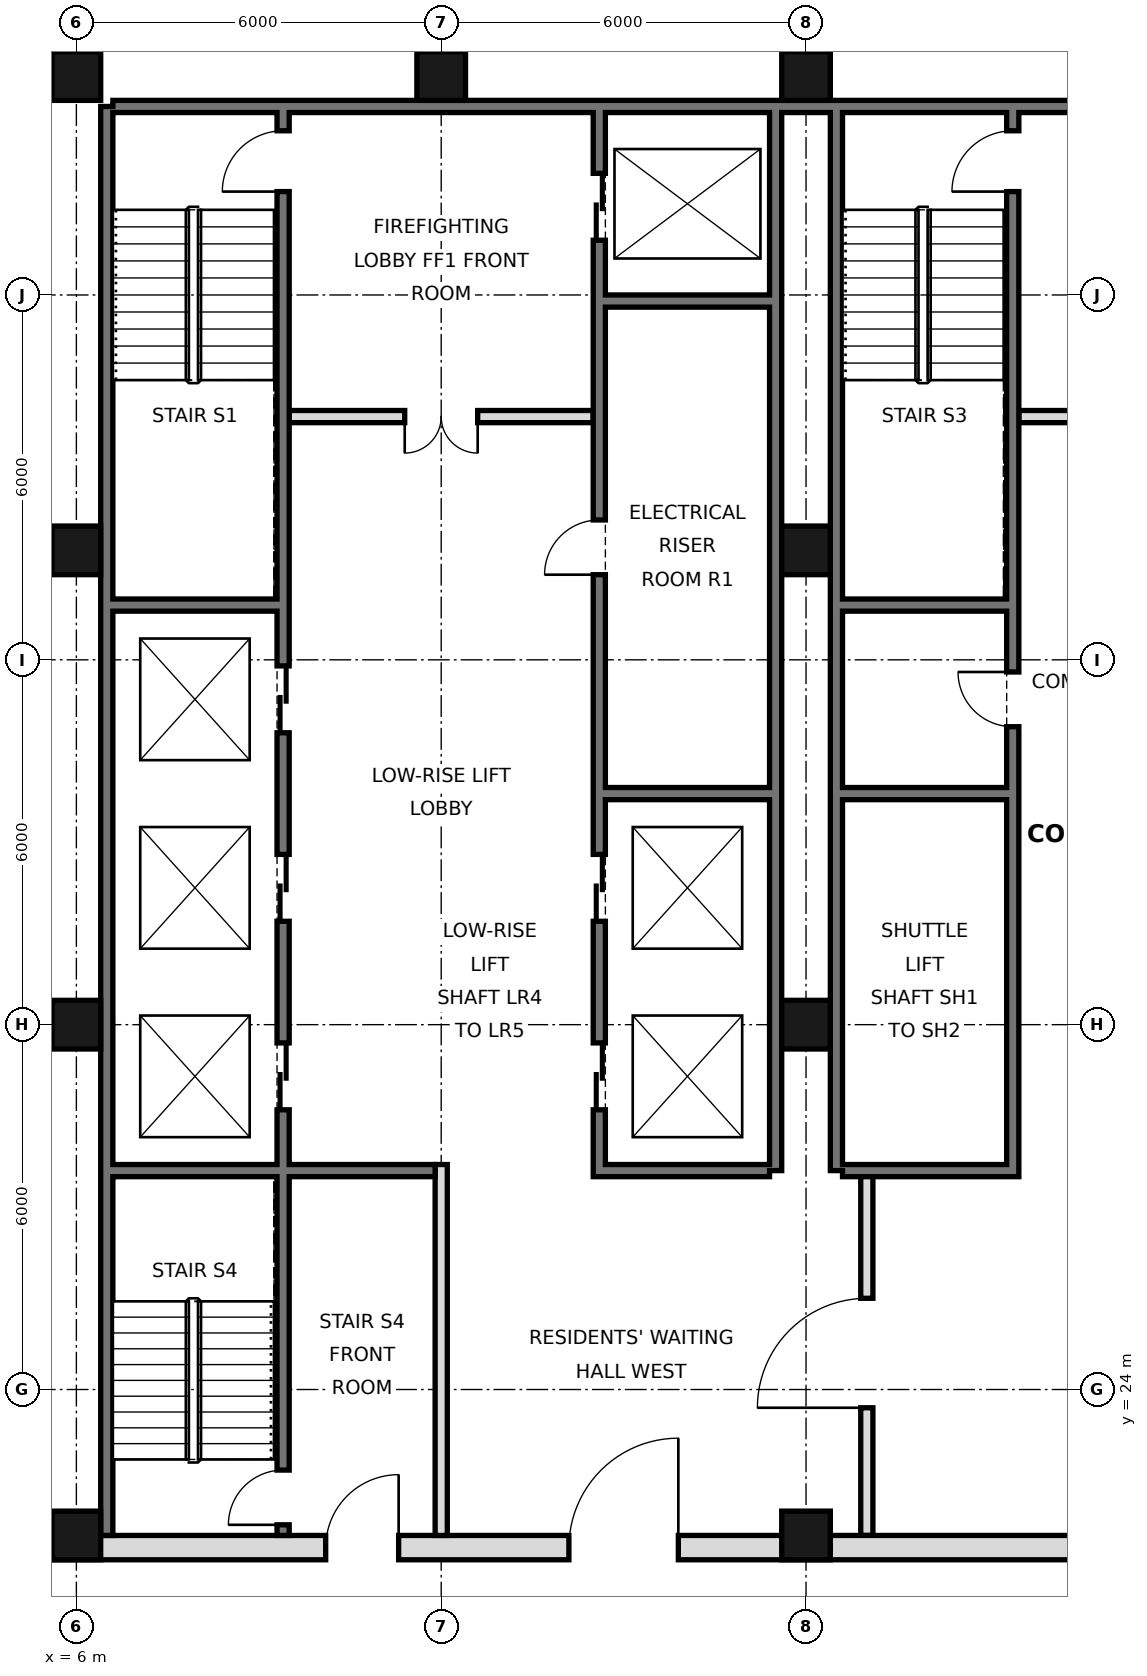
"""IFC4 building model, lengths in metres.
Left out: names, types, materials, properties, quantities, classifications, styles, units other than length and angle.
Written with IfcOpenShell. Run it as: python <this file> out.ifc"""

import sys

from ifc_helpers import new_model, si_unit, direction, frame, frame_2d, origin, origin_2d, place, context, subcontext, project, spatial, rectangle, hollow_rectangle, extrude, element, fill, save


model = new_model("IFC4")
c1 = context("Model", 3, precision=1e-05, world=origin(), true_north=direction((0.0, 1.0)))
c2 = subcontext(c1, "Body", "Model", "MODEL_VIEW")
j1 = project(units=[si_unit("LENGTHUNIT", "METRE"), si_unit("PLANEANGLEUNIT", "RADIAN")], contexts=[c1])
p1 = place(None, origin())
s1 = spatial("IfcSite", under=j1, at=p1, CompositionType="ELEMENT")
p2 = place(p1, origin())
s2 = spatial("IfcBuilding", under=s1, at=p2, CompositionType="ELEMENT")
p3 = place(p2, frame((0.0, 0.0, 96.2)))
s3 = spatial("IfcBuildingStorey", under=s2, at=p3, CompositionType="ELEMENT", Elevation=96.2)
for number, where, z_axis, x_axis in (
    (1, (6.0, 21.6, 0.0), (0.0, 0.0, 1.0), (1.0, 0.0, 0.0)),
    (2, (6.0, 30.0, 0.0), (0.0, 0.0, 1.0), (1.0, 0.0, 0.0)),
    (3, (6.0, 37.8, 0.0), (0.0, 0.0, 1.0), (1.0, 0.0, 0.0)),
    (4, (6.0, 45.6, 0.0), (0.0, 0.0, 1.0), (1.0, 0.0, 0.0)),
    (5, (12.0, 45.6, 0.0), (0.0, 0.0, 1.0), (1.0, 0.0, 0.0)),
    (6, (18.0, 21.6, 0.0), (0.0, 0.0, 1.0), (1.0, 0.0, 0.0)),
    (7, (18.0, 30.0, 0.0), (0.0, 0.0, 1.0), (1.0, 0.0, 0.0)),
    (8, (18.0, 37.8, 0.0), (0.0, 0.0, 1.0), (1.0, 0.0, 0.0)),
    (9, (18.0, 45.6, 0.0), (0.0, 0.0, 1.0), (1.0, 0.0, 0.0)),
):
    element("IfcColumn", number, at=place(p3, frame(where, z_axis=z_axis, x_axis=x_axis)), inside=s3, PredefinedType="COLUMN", context=c2, shape_type="SweptSolid", body=[
        extrude(hollow_rectangle(XDim=0.8, YDim=0.8, WallThickness=0.05, at=origin_2d()), origin(), (0.0, 0.0, 1.0), 3.6),
    ])
p4 = place(p3, frame((6.5, 21.6, 0.0), z_axis=(0.0, 0.0, 1.0), x_axis=(0.0, 1.0, 0.0)))
e10 = element("IfcWall", 10, at=p4, inside=s3, PredefinedType="SOLIDWALL", context=c2, shape_type="SweptSolid", body=[
    extrude(rectangle(XDim=23.5, YDim=0.2, at=frame_2d((11.75, 0.0))), origin(), (0.0, 0.0, 1.0), 3.42),
])
p5 = place(p3, frame((6.6, 45.1, 0.0), z_axis=(0.0, 0.0, 1.0), x_axis=(1.0, 0.0, 0.0)))
e11 = element("IfcWall", 11, at=p5, inside=s3, PredefinedType="SOLIDWALL", context=c2, shape_type="SweptSolid", body=[
    extrude(rectangle(XDim=34.8, YDim=0.2, at=frame_2d((17.4, 0.0))), origin(), (0.0, 0.0, 1.0), 3.42),
])
for number, where, z_axis, x_axis in (
    (12, (17.5, 27.6, 0.0), (0.0, 0.0, 1.0), (0.0, 1.0, 0.0)),
    (13, (18.5, 27.6, 0.0), (0.0, 0.0, 1.0), (0.0, 1.0, 0.0)),
):
    element("IfcWall", number, at=place(p3, frame(where, z_axis=z_axis, x_axis=x_axis)), inside=s3, PredefinedType="SOLIDWALL", context=c2, shape_type="SweptSolid", body=[
        extrude(rectangle(XDim=17.5, YDim=0.2, at=frame_2d((8.75, 0.0))), origin(), (0.0, 0.0, 1.0), 3.42),
    ])
p6 = place(p3, frame((5.6, 21.4, 0.0), z_axis=(0.0, 0.0, 1.0), x_axis=(1.0, 0.0, 0.0)))
e14 = element("IfcWall", 14, at=p6, inside=s3, PredefinedType="SOLIDWALL", context=c2, shape_type="SweptSolid", body=[
    extrude(rectangle(XDim=36.8, YDim=0.4, at=frame_2d((18.4, 0.0))), origin(), (0.0, 0.0, 1.0), 3.42),
])
p7 = place(p6, frame((8.5, 0.0, 0.0)))
e15 = element("IfcOpeningElement", 15, at=p7, cuts=e14, PredefinedType="OPENING", context=c2, shape_type="SweptSolid", body=[
    extrude(rectangle(XDim=1.8, YDim=2.1, at=frame_2d((0.9, 1.05))), frame((0.0, 0.21, 0.0), z_axis=(0.0, -1.0, 0.0), x_axis=(1.0, 0.0, 0.0)), (0.0, 0.0, 1.0), 0.42),
])
p8 = place(p6, frame((17.5, 0.0, 0.0)))
e16 = element("IfcOpeningElement", 16, at=p8, cuts=e14, PredefinedType="OPENING", context=c2, shape_type="SweptSolid", body=[
    extrude(rectangle(XDim=1.8, YDim=2.1, at=frame_2d((0.9, 1.05))), frame((0.0, 0.21, 0.0), z_axis=(0.0, -1.0, 0.0), x_axis=(1.0, 0.0, 0.0)), (0.0, 0.0, 1.0), 0.42),
])
p9 = place(p6, frame((26.5, 0.0, 0.0)))
e17 = element("IfcOpeningElement", 17, at=p9, cuts=e14, PredefinedType="OPENING", context=c2, shape_type="SweptSolid", body=[
    extrude(rectangle(XDim=1.8, YDim=2.1, at=frame_2d((0.9, 1.05))), frame((0.0, 0.21, 0.0), z_axis=(0.0, -1.0, 0.0), x_axis=(1.0, 0.0, 0.0)), (0.0, 0.0, 1.0), 0.42),
])
p10 = place(p6, frame((4.5, 0.0, 0.0)))
e18 = element("IfcOpeningElement", 18, at=p10, cuts=e14, PredefinedType="OPENING", context=c2, shape_type="SweptSolid", body=[
    extrude(rectangle(XDim=1.2, YDim=2.1, at=frame_2d((0.6, 1.05))), frame((0.0, 0.21, 0.0), z_axis=(0.0, -1.0, 0.0), x_axis=(1.0, 0.0, 0.0)), (0.0, 0.0, 1.0), 0.42),
])
p11 = place(p6, frame((31.1, 0.0, 0.0)))
e19 = element("IfcOpeningElement", 19, at=p11, cuts=e14, PredefinedType="OPENING", context=c2, shape_type="SweptSolid", body=[
    extrude(rectangle(XDim=1.2, YDim=2.1, at=frame_2d((0.6, 1.05))), frame((0.0, 0.21, 0.0), z_axis=(0.0, -1.0, 0.0), x_axis=(1.0, 0.0, 0.0)), (0.0, 0.0, 1.0), 0.42),
])
p12 = place(p3, frame((19.0, 21.6, 0.0), z_axis=(0.0, 0.0, 1.0), x_axis=(0.0, 1.0, 0.0)))
e20 = element("IfcWall", 20, at=p12, inside=s3, PredefinedType="PARTITIONING", context=c2, shape_type="SweptSolid", body=[
    extrude(rectangle(XDim=6.0, YDim=0.2, at=frame_2d((3.0, 0.0))), origin(), (0.0, 0.0, 1.0), 3.42),
])
p13 = place(p12, frame((2.1, 0.0, 0.0)))
e21 = element("IfcOpeningElement", 21, at=p13, cuts=e20, PredefinedType="OPENING", context=c2, shape_type="SweptSolid", body=[
    extrude(rectangle(XDim=1.8, YDim=2.1, at=frame_2d((0.9, 1.05))), frame((0.0, 0.11, 0.0), z_axis=(0.0, -1.0, 0.0), x_axis=(1.0, 0.0, 0.0)), (0.0, 0.0, 1.0), 0.22),
])
p14 = place(p3, frame((12.0, 21.6, 0.0), z_axis=(0.0, 0.0, 1.0), x_axis=(0.0, 1.0, 0.0)))
e22 = element("IfcWall", 22, at=p14, inside=s3, PredefinedType="PARTITIONING", context=c2, shape_type="SweptSolid", body=[
    extrude(rectangle(XDim=6.1, YDim=0.2, at=frame_2d((3.05, 0.0))), origin(), (0.0, 0.0, 1.0), 3.42),
])
p15 = place(p3, frame((14.6, 27.5, 0.0), z_axis=(0.0, 0.0, 1.0), x_axis=(0.0, 1.0, 0.0)))
e23 = element("IfcWall", 23, at=p15, inside=s3, PredefinedType="SOLIDWALL", context=c2, shape_type="SweptSolid", body=[
    extrude(rectangle(XDim=17.5, YDim=0.2, at=frame_2d((8.75, 0.0))), origin(), (0.0, 0.0, 1.0), 3.42),
])
p16 = place(p15, frame((1.1, 0.0, 0.0)))
e24 = element("IfcOpeningElement", 24, at=p16, cuts=e23, PredefinedType="OPENING", context=c2, shape_type="SweptSolid", body=[
    extrude(rectangle(XDim=1.1, YDim=2.1, at=frame_2d((0.55, 1.05))), frame((0.0, 0.11, 0.0), z_axis=(0.0, -1.0, 0.0), x_axis=(1.0, 0.0, 0.0)), (0.0, 0.0, 1.0), 0.22),
])
p17 = place(p15, frame((4.2, 0.0, 0.0)))
e25 = element("IfcOpeningElement", 25, at=p17, cuts=e23, PredefinedType="OPENING", context=c2, shape_type="SweptSolid", body=[
    extrude(rectangle(XDim=1.1, YDim=2.1, at=frame_2d((0.55, 1.05))), frame((0.0, 0.11, 0.0), z_axis=(0.0, -1.0, 0.0), x_axis=(1.0, 0.0, 0.0)), (0.0, 0.0, 1.0), 0.22),
])
p18 = place(p15, frame((15.4, 0.0, 0.0)))
e26 = element("IfcOpeningElement", 26, at=p18, cuts=e23, PredefinedType="OPENING", context=c2, shape_type="SweptSolid", body=[
    extrude(rectangle(XDim=1.1, YDim=2.1, at=frame_2d((0.55, 1.05))), frame((0.0, 0.11, 0.0), z_axis=(0.0, -1.0, 0.0), x_axis=(1.0, 0.0, 0.0)), (0.0, 0.0, 1.0), 0.22),
])
p19 = place(p15, frame((9.9, 0.0, 0.0)))
e27 = element("IfcOpeningElement", 27, at=p19, cuts=e23, PredefinedType="OPENING", context=c2, shape_type="SweptSolid", body=[
    extrude(rectangle(XDim=0.9, YDim=2.1, at=frame_2d((0.45, 1.05))), frame((0.0, 0.11, 0.0), z_axis=(0.0, -1.0, 0.0), x_axis=(1.0, 0.0, 0.0)), (0.0, 0.0, 1.0), 0.22),
])
p20 = place(p3, frame((21.4, 27.5, 0.0), z_axis=(0.0, 0.0, 1.0), x_axis=(0.0, 1.0, 0.0)))
e28 = element("IfcWall", 28, at=p20, inside=s3, PredefinedType="SOLIDWALL", context=c2, shape_type="SweptSolid", body=[
    extrude(rectangle(XDim=17.5, YDim=0.2, at=frame_2d((8.75, 0.0))), origin(), (0.0, 0.0, 1.0), 3.42),
])
p21 = place(p20, frame((16.2, 0.0, 0.0)))
e29 = element("IfcOpeningElement", 29, at=p21, cuts=e28, PredefinedType="OPENING", context=c2, shape_type="SweptSolid", body=[
    extrude(rectangle(XDim=1.0, YDim=2.1, at=frame_2d((0.5, 1.05))), frame((0.0, 0.11, 0.0), z_axis=(0.0, -1.0, 0.0), x_axis=(1.0, 0.0, 0.0)), (0.0, 0.0, 1.0), 0.22),
])
p22 = place(p20, frame((7.4, 0.0, 0.0)))
e30 = element("IfcOpeningElement", 30, at=p22, cuts=e28, PredefinedType="OPENING", context=c2, shape_type="SweptSolid", body=[
    extrude(rectangle(XDim=0.9, YDim=2.1, at=frame_2d((0.45, 1.05))), frame((0.0, 0.11, 0.0), z_axis=(0.0, -1.0, 0.0), x_axis=(1.0, 0.0, 0.0)), (0.0, 0.0, 1.0), 0.22),
])
p23 = place(p3, frame((9.4, 21.6, 0.0), z_axis=(0.0, 0.0, 1.0), x_axis=(0.0, 1.0, 0.0)))
e31 = element("IfcWall", 31, at=p23, inside=s3, PredefinedType="SOLIDWALL", context=c2, shape_type="SweptSolid", body=[
    extrude(rectangle(XDim=23.4, YDim=0.2, at=frame_2d((11.7, 0.0))), origin(), (0.0, 0.0, 1.0), 3.42),
])
p24 = place(p23, frame((7.0, 0.0, 0.0)))
e32 = element("IfcOpeningElement", 32, at=p24, cuts=e31, PredefinedType="OPENING", context=c2, shape_type="SweptSolid", body=[
    extrude(rectangle(XDim=1.1, YDim=2.1, at=frame_2d((0.55, 1.05))), frame((0.0, 0.11, 0.0), z_axis=(0.0, -1.0, 0.0), x_axis=(1.0, 0.0, 0.0)), (0.0, 0.0, 1.0), 0.22),
])
p25 = place(p23, frame((10.1, 0.0, 0.0)))
e33 = element("IfcOpeningElement", 33, at=p25, cuts=e31, PredefinedType="OPENING", context=c2, shape_type="SweptSolid", body=[
    extrude(rectangle(XDim=1.1, YDim=2.1, at=frame_2d((0.55, 1.05))), frame((0.0, 0.11, 0.0), z_axis=(0.0, -1.0, 0.0), x_axis=(1.0, 0.0, 0.0)), (0.0, 0.0, 1.0), 0.22),
])
p26 = place(p23, frame((13.2, 0.0, 0.0)))
e34 = element("IfcOpeningElement", 34, at=p26, cuts=e31, PredefinedType="OPENING", context=c2, shape_type="SweptSolid", body=[
    extrude(rectangle(XDim=1.1, YDim=2.1, at=frame_2d((0.55, 1.05))), frame((0.0, 0.11, 0.0), z_axis=(0.0, -1.0, 0.0), x_axis=(1.0, 0.0, 0.0)), (0.0, 0.0, 1.0), 0.22),
])
p27 = place(p23, frame((22.1, 0.0, 0.0)))
e35 = element("IfcOpeningElement", 35, at=p27, cuts=e31, PredefinedType="OPENING", context=c2, shape_type="SweptSolid", body=[
    extrude(rectangle(XDim=1.0, YDim=2.1, at=frame_2d((0.5, 1.05))), frame((0.0, 0.11, 0.0), z_axis=(0.0, -1.0, 0.0), x_axis=(1.0, 0.0, 0.0)), (0.0, 0.0, 1.0), 0.22),
])
p28 = place(p23, frame((0.175, 0.0, 0.0)))
e36 = element("IfcOpeningElement", 36, at=p28, cuts=e31, PredefinedType="OPENING", context=c2, shape_type="SweptSolid", body=[
    extrude(rectangle(XDim=0.9, YDim=2.1, at=frame_2d((0.45, 1.05))), frame((0.0, 0.11, 0.0), z_axis=(0.0, -1.0, 0.0), x_axis=(1.0, 0.0, 0.0)), (0.0, 0.0, 1.0), 0.22),
])
for number, where, z_axis, x_axis in (
    (37, (14.7, 27.6, 0.0), (0.0, 0.0, 1.0), (1.0, 0.0, 0.0)),
    (38, (18.6, 27.6, 0.0), (0.0, 0.0, 1.0), (1.0, 0.0, 0.0)),
):
    element("IfcWall", number, at=place(p3, frame(where, z_axis=z_axis, x_axis=x_axis)), inside=s3, PredefinedType="SOLIDWALL", context=c2, shape_type="SweptSolid", body=[
        extrude(rectangle(XDim=2.7, YDim=0.2, at=frame_2d((1.35, 0.0))), origin(), (0.0, 0.0, 1.0), 3.42),
    ])
p29 = place(p3, frame((6.6, 27.6, 0.0), z_axis=(0.0, 0.0, 1.0), x_axis=(1.0, 0.0, 0.0)))
e39 = element("IfcWall", 39, at=p29, inside=s3, PredefinedType="SOLIDWALL", context=c2, shape_type="SweptSolid", body=[
    extrude(rectangle(XDim=5.3, YDim=0.2, at=frame_2d((2.65, 0.0))), origin(), (0.0, 0.0, 1.0), 3.42),
])
for number, where, z_axis, x_axis in (
    (40, (14.7, 33.8, 0.0), (0.0, 0.0, 1.0), (1.0, 0.0, 0.0)),
    (41, (18.6, 33.8, 0.0), (0.0, 0.0, 1.0), (1.0, 0.0, 0.0)),
    (42, (18.6, 36.9, 0.0), (0.0, 0.0, 1.0), (1.0, 0.0, 0.0)),
    (43, (6.6, 36.9, 0.0), (0.0, 0.0, 1.0), (1.0, 0.0, 0.0)),
):
    element("IfcWall", number, at=place(p3, frame(where, z_axis=z_axis, x_axis=x_axis)), inside=s3, PredefinedType="SOLIDWALL", context=c2, shape_type="SweptSolid", body=[
        extrude(rectangle(XDim=2.7, YDim=0.2, at=frame_2d((1.35, 0.0))), origin(), (0.0, 0.0, 1.0), 3.42),
    ])
p30 = place(p3, frame((21.5, 40.0, 0.0), z_axis=(0.0, 0.0, 1.0), x_axis=(1.0, 0.0, 0.0)))
e44 = element("IfcWall", 44, at=p30, inside=s3, PredefinedType="PARTITIONING", context=c2, shape_type="SweptSolid", body=[
    extrude(rectangle(XDim=5.0, YDim=0.2, at=frame_2d((2.5, 0.0))), origin(), (0.0, 0.0, 1.0), 3.42),
])
p31 = place(p30, frame((1.9, 0.0, 0.0)))
e45 = element("IfcOpeningElement", 45, at=p31, cuts=e44, PredefinedType="OPENING", context=c2, shape_type="SweptSolid", body=[
    extrude(rectangle(XDim=1.2, YDim=2.1, at=frame_2d((0.6, 1.05))), frame((0.0, 0.11, 0.0), z_axis=(0.0, -1.0, 0.0), x_axis=(1.0, 0.0, 0.0)), (0.0, 0.0, 1.0), 0.22),
])
p32 = place(p3, frame((9.5, 40.0, 0.0), z_axis=(0.0, 0.0, 1.0), x_axis=(1.0, 0.0, 0.0)))
e46 = element("IfcWall", 46, at=p32, inside=s3, PredefinedType="PARTITIONING", context=c2, shape_type="SweptSolid", body=[
    extrude(rectangle(XDim=5.0, YDim=0.2, at=frame_2d((2.5, 0.0))), origin(), (0.0, 0.0, 1.0), 3.42),
])
p33 = place(p32, frame((1.9, 0.0, 0.0)))
e47 = element("IfcOpeningElement", 47, at=p33, cuts=e46, PredefinedType="OPENING", context=c2, shape_type="SweptSolid", body=[
    extrude(rectangle(XDim=1.2, YDim=2.1, at=frame_2d((0.6, 1.05))), frame((0.0, 0.11, 0.0), z_axis=(0.0, -1.0, 0.0), x_axis=(1.0, 0.0, 0.0)), (0.0, 0.0, 1.0), 0.22),
])
p34 = place(p3, frame((14.7, 41.9, 0.0), z_axis=(0.0, 0.0, 1.0), x_axis=(1.0, 0.0, 0.0)))
e48 = element("IfcWall", 48, at=p34, inside=s3, PredefinedType="SOLIDWALL", context=c2, shape_type="SweptSolid", body=[
    extrude(rectangle(XDim=2.7, YDim=0.2, at=frame_2d((1.35, 0.0))), origin(), (0.0, 0.0, 1.0), 3.42),
])
p35 = place(p7, frame((1.8, 0.0, 0.0), z_axis=(0.0, 0.0, 1.0), x_axis=(-1.0, 0.0, 0.0)))
e49 = element("IfcDoor", 49, at=p35, inside=s3, OperationType="SINGLE_SWING_LEFT", PredefinedType="DOOR", context=c2, shape_type="SweptSolid", body=[
    extrude(rectangle(XDim=1.8, YDim=2.1, at=frame_2d((0.9, 1.05))), frame((0.0, 0.025, 0.0), z_axis=(0.0, -1.0, 0.0), x_axis=(1.0, 0.0, 0.0)), (0.0, 0.0, 1.0), 0.05),
])
fill(e15, e49)
p36 = place(p13, origin())
e50 = element("IfcDoor", 50, at=p36, inside=s3, OperationType="SINGLE_SWING_LEFT", PredefinedType="DOOR", context=c2, shape_type="SweptSolid", body=[
    extrude(rectangle(XDim=1.8, YDim=2.1, at=frame_2d((0.9, 1.05))), frame((0.0, 0.025, 0.0), z_axis=(0.0, -1.0, 0.0), x_axis=(1.0, 0.0, 0.0)), (0.0, 0.0, 1.0), 0.05),
])
fill(e21, e50)
p37 = place(p10, frame((1.2, 0.0, 0.0), z_axis=(0.0, 0.0, 1.0), x_axis=(-1.0, 0.0, 0.0)))
e51 = element("IfcDoor", 51, at=p37, inside=s3, OperationType="SINGLE_SWING_LEFT", PredefinedType="DOOR", context=c2, shape_type="SweptSolid", body=[
    extrude(rectangle(XDim=1.2, YDim=2.1, at=frame_2d((0.6, 1.05))), frame((0.0, 0.025, 0.0), z_axis=(0.0, -1.0, 0.0), x_axis=(1.0, 0.0, 0.0)), (0.0, 0.0, 1.0), 0.05),
])
fill(e18, e51)
p38 = place(p33, frame((1.2, 0.0, 0.0), z_axis=(0.0, 0.0, 1.0), x_axis=(-1.0, 0.0, 0.0)))
e52 = element("IfcDoor", 52, at=p38, inside=s3, OperationType="DOUBLE_DOOR_SINGLE_SWING", PredefinedType="DOOR", context=c2, shape_type="SweptSolid", body=[
    extrude(rectangle(XDim=1.2, YDim=2.1, at=frame_2d((0.6, 1.05))), frame((0.0, 0.025, 0.0), z_axis=(0.0, -1.0, 0.0), x_axis=(1.0, 0.0, 0.0)), (0.0, 0.0, 1.0), 0.05),
])
fill(e47, e52)
p39 = place(p16, origin())
e53 = element("IfcDoor", 53, at=p39, inside=s3, OperationType="DOUBLE_DOOR_SLIDING", PredefinedType="DOOR", context=c2, shape_type="SweptSolid", body=[
    extrude(rectangle(XDim=1.1, YDim=2.1, at=frame_2d((0.55, 1.05))), frame((0.0, 0.025, 0.0), z_axis=(0.0, -1.0, 0.0), x_axis=(1.0, 0.0, 0.0)), (0.0, 0.0, 1.0), 0.05),
])
fill(e24, e53)
p40 = place(p17, origin())
e54 = element("IfcDoor", 54, at=p40, inside=s3, OperationType="DOUBLE_DOOR_SLIDING", PredefinedType="DOOR", context=c2, shape_type="SweptSolid", body=[
    extrude(rectangle(XDim=1.1, YDim=2.1, at=frame_2d((0.55, 1.05))), frame((0.0, 0.025, 0.0), z_axis=(0.0, -1.0, 0.0), x_axis=(1.0, 0.0, 0.0)), (0.0, 0.0, 1.0), 0.05),
])
fill(e25, e54)
p41 = place(p18, origin())
e55 = element("IfcDoor", 55, at=p41, inside=s3, OperationType="DOUBLE_DOOR_SLIDING", PredefinedType="DOOR", context=c2, shape_type="SweptSolid", body=[
    extrude(rectangle(XDim=1.1, YDim=2.1, at=frame_2d((0.55, 1.05))), frame((0.0, 0.025, 0.0), z_axis=(0.0, -1.0, 0.0), x_axis=(1.0, 0.0, 0.0)), (0.0, 0.0, 1.0), 0.05),
])
fill(e26, e55)
p42 = place(p24, origin())
e56 = element("IfcDoor", 56, at=p42, inside=s3, OperationType="DOUBLE_DOOR_SLIDING", PredefinedType="DOOR", context=c2, shape_type="SweptSolid", body=[
    extrude(rectangle(XDim=1.1, YDim=2.1, at=frame_2d((0.55, 1.05))), frame((0.0, 0.025, 0.0), z_axis=(0.0, -1.0, 0.0), x_axis=(1.0, 0.0, 0.0)), (0.0, 0.0, 1.0), 0.05),
])
fill(e32, e56)
p43 = place(p25, origin())
e57 = element("IfcDoor", 57, at=p43, inside=s3, OperationType="DOUBLE_DOOR_SLIDING", PredefinedType="DOOR", context=c2, shape_type="SweptSolid", body=[
    extrude(rectangle(XDim=1.1, YDim=2.1, at=frame_2d((0.55, 1.05))), frame((0.0, 0.025, 0.0), z_axis=(0.0, -1.0, 0.0), x_axis=(1.0, 0.0, 0.0)), (0.0, 0.0, 1.0), 0.05),
])
fill(e33, e57)
p44 = place(p26, origin())
e58 = element("IfcDoor", 58, at=p44, inside=s3, OperationType="DOUBLE_DOOR_SLIDING", PredefinedType="DOOR", context=c2, shape_type="SweptSolid", body=[
    extrude(rectangle(XDim=1.1, YDim=2.1, at=frame_2d((0.55, 1.05))), frame((0.0, 0.025, 0.0), z_axis=(0.0, -1.0, 0.0), x_axis=(1.0, 0.0, 0.0)), (0.0, 0.0, 1.0), 0.05),
])
fill(e34, e58)
p45 = place(p27, origin())
e59 = element("IfcDoor", 59, at=p45, inside=s3, OperationType="SINGLE_SWING_LEFT", PredefinedType="DOOR", context=c2, shape_type="SweptSolid", body=[
    extrude(rectangle(XDim=1.0, YDim=2.1, at=frame_2d((0.5, 1.05))), frame((0.0, 0.025, 0.0), z_axis=(0.0, -1.0, 0.0), x_axis=(1.0, 0.0, 0.0)), (0.0, 0.0, 1.0), 0.05),
])
fill(e35, e59)
p46 = place(p21, origin())
e60 = element("IfcDoor", 60, at=p46, inside=s3, OperationType="SINGLE_SWING_LEFT", PredefinedType="DOOR", context=c2, shape_type="SweptSolid", body=[
    extrude(rectangle(XDim=1.0, YDim=2.1, at=frame_2d((0.5, 1.05))), frame((0.0, 0.025, 0.0), z_axis=(0.0, -1.0, 0.0), x_axis=(1.0, 0.0, 0.0)), (0.0, 0.0, 1.0), 0.05),
])
fill(e29, e60)
p47 = place(p28, origin())
e61 = element("IfcDoor", 61, at=p47, inside=s3, OperationType="SINGLE_SWING_LEFT", PredefinedType="DOOR", context=c2, shape_type="SweptSolid", body=[
    extrude(rectangle(XDim=0.9, YDim=2.1, at=frame_2d((0.45, 1.05))), frame((0.0, 0.025, 0.0), z_axis=(0.0, -1.0, 0.0), x_axis=(1.0, 0.0, 0.0)), (0.0, 0.0, 1.0), 0.05),
])
fill(e36, e61)
p48 = place(p19, origin())
e62 = element("IfcDoor", 62, at=p48, inside=s3, OperationType="SINGLE_SWING_LEFT", PredefinedType="DOOR", context=c2, shape_type="SweptSolid", body=[
    extrude(rectangle(XDim=0.9, YDim=2.1, at=frame_2d((0.45, 1.05))), frame((0.0, 0.025, 0.0), z_axis=(0.0, -1.0, 0.0), x_axis=(1.0, 0.0, 0.0)), (0.0, 0.0, 1.0), 0.05),
])
fill(e27, e62)
p49 = place(p22, frame((0.9, 0.0, 0.0), z_axis=(0.0, 0.0, 1.0), x_axis=(-1.0, 0.0, 0.0)))
e63 = element("IfcDoor", 63, at=p49, inside=s3, OperationType="SINGLE_SWING_LEFT", PredefinedType="DOOR", context=c2, shape_type="SweptSolid", body=[
    extrude(rectangle(XDim=0.9, YDim=2.1, at=frame_2d((0.45, 1.05))), frame((0.0, 0.025, 0.0), z_axis=(0.0, -1.0, 0.0), x_axis=(1.0, 0.0, 0.0)), (0.0, 0.0, 1.0), 0.05),
])
fill(e30, e63)
save(model, sys.argv[1])
